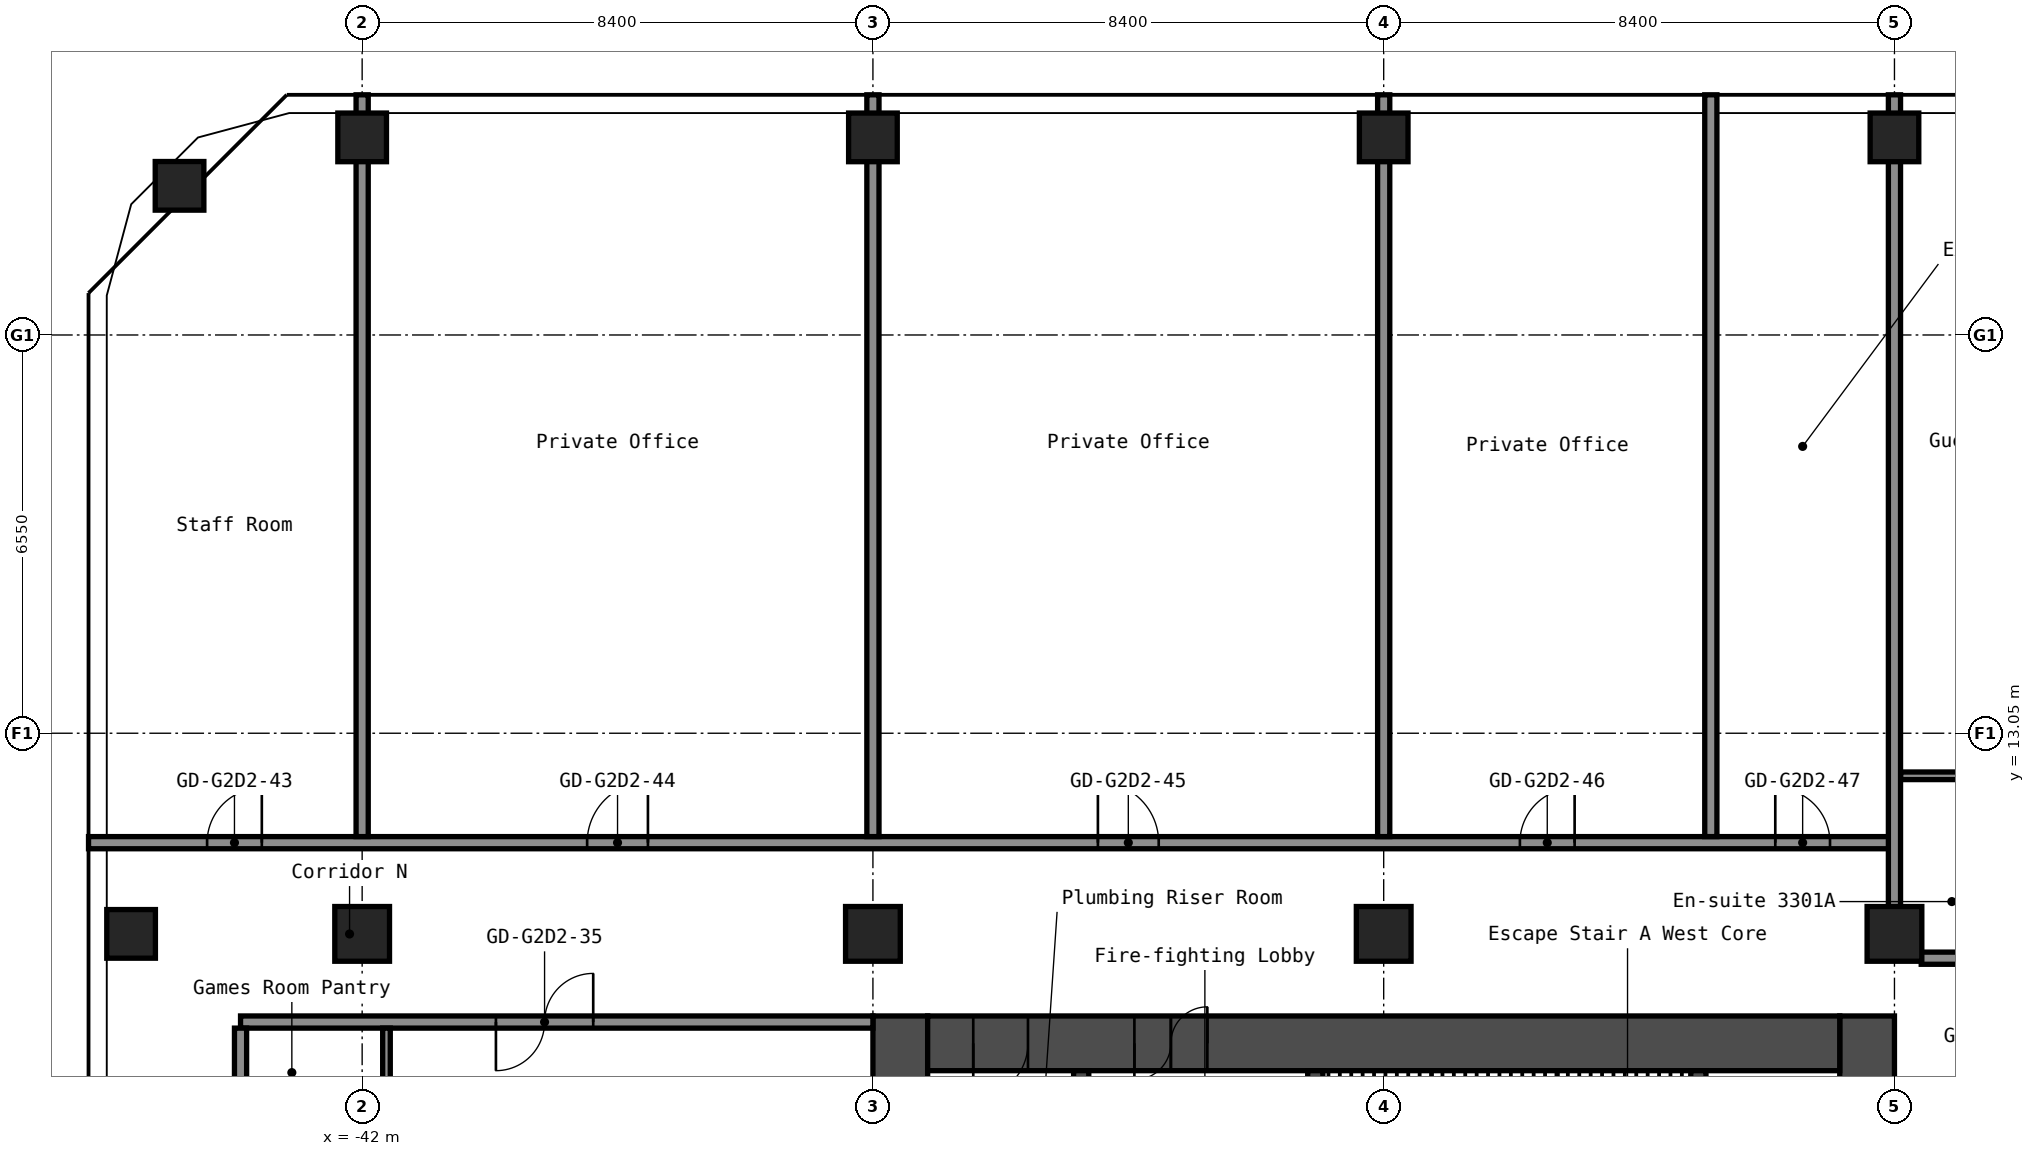
"""IFC4 building model, lengths in metres.
Left out: names, types, materials, properties, quantities, classifications, styles, units other than length and angle.
Written with IfcOpenShell. Run it as: python <this file> out.ifc"""

import sys

from ifc_helpers import new_model, si_unit, direction, frame, frame_2d, origin, origin_2d, place, context, subcontext, project, spatial, rectangle, hollow_rectangle, extrude, element, fill, save


model = new_model("IFC4")
c1 = context("Model", 3, precision=1e-05, world=origin(), true_north=direction((0.0, 1.0)))
c2 = subcontext(c1, "Body", "Model", "MODEL_VIEW")
j1 = project(units=[si_unit("LENGTHUNIT", "METRE"), si_unit("PLANEANGLEUNIT", "RADIAN")], contexts=[c1])
p1 = place(None, origin())
s1 = spatial("IfcSite", under=j1, at=p1, CompositionType="ELEMENT")
p2 = place(p1, origin())
s2 = spatial("IfcBuilding", under=s1, at=p2, CompositionType="ELEMENT")
p3 = place(p2, frame((0.0, 0.0, 117.0)))
s3 = spatial("IfcBuildingStorey", under=s2, at=p3, CompositionType="ELEMENT", Elevation=117.0)
for number, where, z_axis, x_axis in (
    (1, (-45.8, 9.75, 0.0), (0.0, 0.0, 1.0), (1.0, 0.0, 0.0)),
    (2, (-45.003, 22.053, 0.0), (0.0, 0.0, 1.0), (1.0, 0.0, 0.0)),
):
    element("IfcColumn", number, at=place(p3, frame(where, z_axis=z_axis, x_axis=x_axis)), inside=s3, PredefinedType="COLUMN", context=c2, shape_type="SweptSolid", body=[
        extrude(hollow_rectangle(XDim=0.8, YDim=0.8, WallThickness=0.032, at=origin_2d()), origin(), (0.0, 0.0, 1.0), 2.9),
    ])
p4 = place(p3, frame((-42.0, 9.75, 0.0), z_axis=(0.0, 0.0, 1.0), x_axis=(1.0, 0.0, 0.0)))
e3 = element("IfcColumn", 3, at=p4, inside=s3, PredefinedType="COLUMN", context=c2, shape_type="SweptSolid", body=[
    extrude(hollow_rectangle(XDim=0.9, YDim=0.9, WallThickness=0.036, at=origin_2d()), origin(), (0.0, 0.0, 1.0), 2.9),
])
p5 = place(p3, frame((-42.0, 22.85, 0.0), z_axis=(0.0, 0.0, 1.0), x_axis=(1.0, 0.0, 0.0)))
e4 = element("IfcColumn", 4, at=p5, inside=s3, PredefinedType="COLUMN", context=c2, shape_type="SweptSolid", body=[
    extrude(hollow_rectangle(XDim=0.8, YDim=0.8, WallThickness=0.032, at=origin_2d()), origin(), (0.0, 0.0, 1.0), 2.9),
])
p6 = place(p3, frame((-33.6, 9.75, 0.0), z_axis=(0.0, 0.0, 1.0), x_axis=(1.0, 0.0, 0.0)))
e5 = element("IfcColumn", 5, at=p6, inside=s3, PredefinedType="COLUMN", context=c2, shape_type="SweptSolid", body=[
    extrude(hollow_rectangle(XDim=0.9, YDim=0.9, WallThickness=0.036, at=origin_2d()), origin(), (0.0, 0.0, 1.0), 2.9),
])
p7 = place(p3, frame((-33.6, 22.85, 0.0), z_axis=(0.0, 0.0, 1.0), x_axis=(1.0, 0.0, 0.0)))
e6 = element("IfcColumn", 6, at=p7, inside=s3, PredefinedType="COLUMN", context=c2, shape_type="SweptSolid", body=[
    extrude(hollow_rectangle(XDim=0.8, YDim=0.8, WallThickness=0.032, at=origin_2d()), origin(), (0.0, 0.0, 1.0), 2.9),
])
p8 = place(p3, frame((-25.2, 9.75, 0.0), z_axis=(0.0, 0.0, 1.0), x_axis=(1.0, 0.0, 0.0)))
e7 = element("IfcColumn", 7, at=p8, inside=s3, PredefinedType="COLUMN", context=c2, shape_type="SweptSolid", body=[
    extrude(hollow_rectangle(XDim=0.9, YDim=0.9, WallThickness=0.036, at=origin_2d()), origin(), (0.0, 0.0, 1.0), 2.9),
])
p9 = place(p3, frame((-25.2, 22.85, 0.0), z_axis=(0.0, 0.0, 1.0), x_axis=(1.0, 0.0, 0.0)))
e8 = element("IfcColumn", 8, at=p9, inside=s3, PredefinedType="COLUMN", context=c2, shape_type="SweptSolid", body=[
    extrude(hollow_rectangle(XDim=0.8, YDim=0.8, WallThickness=0.032, at=origin_2d()), origin(), (0.0, 0.0, 1.0), 2.9),
])
p10 = place(p3, frame((-16.8, 9.75, 0.0), z_axis=(0.0, 0.0, 1.0), x_axis=(1.0, 0.0, 0.0)))
e9 = element("IfcColumn", 9, at=p10, inside=s3, PredefinedType="COLUMN", context=c2, shape_type="SweptSolid", body=[
    extrude(hollow_rectangle(XDim=0.9, YDim=0.9, WallThickness=0.036, at=origin_2d()), origin(), (0.0, 0.0, 1.0), 2.9),
])
p11 = place(p3, frame((-16.8, 22.85, 0.0), z_axis=(0.0, 0.0, 1.0), x_axis=(1.0, 0.0, 0.0)))
e10 = element("IfcColumn", 10, at=p11, inside=s3, PredefinedType="COLUMN", context=c2, shape_type="SweptSolid", body=[
    extrude(hollow_rectangle(XDim=0.8, YDim=0.8, WallThickness=0.032, at=origin_2d()), origin(), (0.0, 0.0, 1.0), 2.9),
])
p12 = place(p3, frame((-17.25, -8.4, 0.0), z_axis=(0.0, 0.0, 1.0), x_axis=(0.0, 1.0, 0.0)))
e11 = element("IfcWall", 11, at=p12, inside=s3, PredefinedType="SHEAR", context=c2, shape_type="SweptSolid", body=[
    extrude(rectangle(XDim=16.8, YDim=0.9, at=frame_2d((8.4, 0.0))), origin(), (0.0, 0.0, 1.0), 2.9),
])
p13 = place(p12, frame((7.6, 0.0, 0.0)))
e12 = element("IfcOpeningElement", 12, at=p13, cuts=e11, PredefinedType="OPENING", context=c2, shape_type="SweptSolid", body=[
    extrude(rectangle(XDim=1.2, YDim=2.1, at=frame_2d((0.6, 1.05))), frame((0.0, 0.46, 0.0), z_axis=(0.0, -1.0, 0.0), x_axis=(1.0, 0.0, 0.0)), (0.0, 0.0, 1.0), 0.92),
])
p14 = place(p3, frame((-33.15, -8.4, 0.0), z_axis=(0.0, 0.0, 1.0), x_axis=(0.0, 1.0, 0.0)))
e13 = element("IfcWall", 13, at=p14, inside=s3, PredefinedType="SHEAR", context=c2, shape_type="SweptSolid", body=[
    extrude(rectangle(XDim=16.8, YDim=0.9, at=frame_2d((8.4, 0.0))), origin(), (0.0, 0.0, 1.0), 2.9),
])
p15 = place(p3, frame((-32.7, 7.95, 0.0), z_axis=(0.0, 0.0, 1.0), x_axis=(1.0, 0.0, 0.0)))
e14 = element("IfcWall", 14, at=p15, inside=s3, PredefinedType="SHEAR", context=c2, shape_type="SweptSolid", body=[
    extrude(rectangle(XDim=15.0, YDim=0.9, at=frame_2d((7.5, 0.0))), origin(), (0.0, 0.0, 1.0), 2.9),
])
p16 = place(p15, frame((3.4, 0.0, 0.0)))
e15 = element("IfcOpeningElement", 15, at=p16, cuts=e14, PredefinedType="OPENING", context=c2, shape_type="SweptSolid", body=[
    extrude(rectangle(XDim=1.2, YDim=2.1, at=frame_2d((0.6, 1.05))), frame((0.0, 0.46, 0.0), z_axis=(0.0, -1.0, 0.0), x_axis=(1.0, 0.0, 0.0)), (0.0, 0.0, 1.0), 0.92),
])
p17 = place(p15, frame((0.75, 0.0, 0.0)))
e16 = element("IfcOpeningElement", 16, at=p17, cuts=e14, PredefinedType="OPENING", context=c2, shape_type="SweptSolid", body=[
    extrude(rectangle(XDim=0.9, YDim=2.1, at=frame_2d((0.45, 1.05))), frame((0.0, 0.46, 0.0), z_axis=(0.0, -1.0, 0.0), x_axis=(1.0, 0.0, 0.0)), (0.0, 0.0, 1.0), 0.92),
])
p18 = place(p3, frame((-20.025, 1.2, 0.0), z_axis=(0.0, 0.0, 1.0), x_axis=(0.0, 1.0, 0.0)))
e17 = element("IfcWall", 17, at=p18, inside=s3, PredefinedType="SHEAR", context=c2, shape_type="SweptSolid", body=[
    extrude(rectangle(XDim=6.3, YDim=0.25, at=frame_2d((3.15, 0.0))), origin(), (0.0, 0.0, 1.0), 2.9),
])
p19 = place(p3, frame((-26.325, 3.75, 0.0), z_axis=(0.0, 0.0, 1.0), x_axis=(0.0, 1.0, 0.0)))
e18 = element("IfcWall", 18, at=p19, inside=s3, PredefinedType="SHEAR", context=c2, shape_type="SweptSolid", body=[
    extrude(rectangle(XDim=3.75, YDim=0.25, at=frame_2d((1.875, 0.0))), origin(), (0.0, 0.0, 1.0), 2.9),
])
p20 = place(p19, frame((1.25, 0.0, 0.0)))
e19 = element("IfcOpeningElement", 19, at=p20, cuts=e18, PredefinedType="OPENING", context=c2, shape_type="SweptSolid", body=[
    extrude(rectangle(XDim=1.2, YDim=2.1, at=frame_2d((0.6, 1.05))), frame((0.0, 0.135, 0.0), z_axis=(0.0, -1.0, 0.0), x_axis=(1.0, 0.0, 0.0)), (0.0, 0.0, 1.0), 0.27),
])
p21 = place(p3, frame((-30.175, 1.45, 0.0), z_axis=(0.0, 0.0, 1.0), x_axis=(0.0, 1.0, 0.0)))
e20 = element("IfcWall", 20, at=p21, inside=s3, PredefinedType="SHEAR", context=c2, shape_type="SweptSolid", body=[
    extrude(rectangle(XDim=6.05, YDim=0.25, at=frame_2d((3.025, 0.0))), origin(), (0.0, 0.0, 1.0), 2.9),
])
p22 = place(p21, frame((2.625, 0.0, 0.0)))
e21 = element("IfcOpeningElement", 21, at=p22, cuts=e20, PredefinedType="OPENING", context=c2, shape_type="SweptSolid", body=[
    extrude(rectangle(XDim=1.1, YDim=2.1, at=frame_2d((0.55, 1.05))), frame((0.0, 0.135, 0.0), z_axis=(0.0, -1.0, 0.0), x_axis=(1.0, 0.0, 0.0)), (0.0, 0.0, 1.0), 0.27),
])
p23 = place(p3, frame((-44.0, 8.3, 0.0), z_axis=(0.0, 0.0, 1.0), x_axis=(1.0, 0.0, 0.0)))
e22 = element("IfcWall", 22, at=p23, inside=s3, PredefinedType="PARTITIONING", context=c2, shape_type="SweptSolid", body=[
    extrude(rectangle(XDim=10.4, YDim=0.2, at=frame_2d((5.2, 0.0))), origin(), (0.0, 0.0, 1.0), 2.9),
])
p24 = place(p23, frame((4.2, 0.0, 0.0)))
e23 = element("IfcOpeningElement", 23, at=p24, cuts=e22, PredefinedType="OPENING", context=c2, shape_type="SweptSolid", body=[
    extrude(rectangle(XDim=1.6, YDim=2.1, at=frame_2d((0.8, 1.05))), frame((0.0, 0.11, 0.0), z_axis=(0.0, -1.0, 0.0), x_axis=(1.0, 0.0, 0.0)), (0.0, 0.0, 1.0), 0.22),
])
p25 = place(p3, frame((-16.36, 9.35, 0.0), z_axis=(0.0, 0.0, 1.0), x_axis=(1.0, 0.0, 0.0)))
e24 = element("IfcWall", 24, at=p25, inside=s3, PredefinedType="PARTITIONING", context=c2, shape_type="SweptSolid", body=[
    extrude(rectangle(XDim=32.72, YDim=0.2, at=frame_2d((16.36, 0.0))), origin(), (0.0, 0.0, 1.0), 2.9),
])
p26 = place(p25, frame((2.41, 0.0, 0.0)))
e25 = element("IfcOpeningElement", 25, at=p26, cuts=e24, PredefinedType="OPENING", context=c2, shape_type="SweptSolid", body=[
    extrude(rectangle(XDim=1.0, YDim=2.1, at=frame_2d((0.5, 1.05))), frame((0.0, 0.11, 0.0), z_axis=(0.0, -1.0, 0.0), x_axis=(1.0, 0.0, 0.0)), (0.0, 0.0, 1.0), 0.22),
])
p27 = place(p25, frame((4.11, 0.0, 0.0)))
e26 = element("IfcOpeningElement", 26, at=p27, cuts=e24, PredefinedType="OPENING", context=c2, shape_type="SweptSolid", body=[
    extrude(rectangle(XDim=1.0, YDim=2.1, at=frame_2d((0.5, 1.05))), frame((0.0, 0.11, 0.0), z_axis=(0.0, -1.0, 0.0), x_axis=(1.0, 0.0, 0.0)), (0.0, 0.0, 1.0), 0.22),
])
p28 = place(p25, frame((9.96, 0.0, 0.0)))
e27 = element("IfcOpeningElement", 27, at=p28, cuts=e24, PredefinedType="OPENING", context=c2, shape_type="SweptSolid", body=[
    extrude(rectangle(XDim=1.0, YDim=2.1, at=frame_2d((0.5, 1.05))), frame((0.0, 0.11, 0.0), z_axis=(0.0, -1.0, 0.0), x_axis=(1.0, 0.0, 0.0)), (0.0, 0.0, 1.0), 0.22),
])
p29 = place(p25, frame((19.21, 0.0, 0.0)))
e28 = element("IfcOpeningElement", 28, at=p29, cuts=e24, PredefinedType="OPENING", context=c2, shape_type="SweptSolid", body=[
    extrude(rectangle(XDim=1.0, YDim=2.1, at=frame_2d((0.5, 1.05))), frame((0.0, 0.11, 0.0), z_axis=(0.0, -1.0, 0.0), x_axis=(1.0, 0.0, 0.0)), (0.0, 0.0, 1.0), 0.22),
])
p30 = place(p25, frame((20.91, 0.0, 0.0)))
e29 = element("IfcOpeningElement", 29, at=p30, cuts=e24, PredefinedType="OPENING", context=c2, shape_type="SweptSolid", body=[
    extrude(rectangle(XDim=1.0, YDim=2.1, at=frame_2d((0.5, 1.05))), frame((0.0, 0.11, 0.0), z_axis=(0.0, -1.0, 0.0), x_axis=(1.0, 0.0, 0.0)), (0.0, 0.0, 1.0), 0.22),
])
p31 = place(p25, frame((26.76, 0.0, 0.0)))
e30 = element("IfcOpeningElement", 30, at=p31, cuts=e24, PredefinedType="OPENING", context=c2, shape_type="SweptSolid", body=[
    extrude(rectangle(XDim=1.0, YDim=2.1, at=frame_2d((0.5, 1.05))), frame((0.0, 0.11, 0.0), z_axis=(0.0, -1.0, 0.0), x_axis=(1.0, 0.0, 0.0)), (0.0, 0.0, 1.0), 0.22),
])
p32 = place(p3, frame((-46.5, 11.25, 0.0), z_axis=(0.0, 0.0, 1.0), x_axis=(1.0, 0.0, 0.0)))
e31 = element("IfcWall", 31, at=p32, inside=s3, PredefinedType="PARTITIONING", context=c2, shape_type="SweptSolid", body=[
    extrude(rectangle(XDim=29.7, YDim=0.2, at=frame_2d((14.85, 0.0))), origin(), (0.0, 0.0, 1.0), 2.9),
])
p33 = place(p32, frame((1.95, 0.0, 0.0)))
e32 = element("IfcOpeningElement", 32, at=p33, cuts=e31, PredefinedType="OPENING", context=c2, shape_type="SweptSolid", body=[
    extrude(rectangle(XDim=0.9, YDim=2.1, at=frame_2d((0.45, 1.05))), frame((0.0, 0.11, 0.0), z_axis=(0.0, -1.0, 0.0), x_axis=(1.0, 0.0, 0.0)), (0.0, 0.0, 1.0), 0.22),
])
p34 = place(p32, frame((8.2, 0.0, 0.0)))
e33 = element("IfcOpeningElement", 33, at=p34, cuts=e31, PredefinedType="OPENING", context=c2, shape_type="SweptSolid", body=[
    extrude(rectangle(XDim=1.0, YDim=2.1, at=frame_2d((0.5, 1.05))), frame((0.0, 0.11, 0.0), z_axis=(0.0, -1.0, 0.0), x_axis=(1.0, 0.0, 0.0)), (0.0, 0.0, 1.0), 0.22),
])
p35 = place(p32, frame((16.6, 0.0, 0.0)))
e34 = element("IfcOpeningElement", 34, at=p35, cuts=e31, PredefinedType="OPENING", context=c2, shape_type="SweptSolid", body=[
    extrude(rectangle(XDim=1.0, YDim=2.1, at=frame_2d((0.5, 1.05))), frame((0.0, 0.11, 0.0), z_axis=(0.0, -1.0, 0.0), x_axis=(1.0, 0.0, 0.0)), (0.0, 0.0, 1.0), 0.22),
])
p36 = place(p32, frame((23.54, 0.0, 0.0)))
e35 = element("IfcOpeningElement", 35, at=p36, cuts=e31, PredefinedType="OPENING", context=c2, shape_type="SweptSolid", body=[
    extrude(rectangle(XDim=0.9, YDim=2.1, at=frame_2d((0.45, 1.05))), frame((0.0, 0.11, 0.0), z_axis=(0.0, -1.0, 0.0), x_axis=(1.0, 0.0, 0.0)), (0.0, 0.0, 1.0), 0.22),
])
p37 = place(p32, frame((27.74, 0.0, 0.0)))
e36 = element("IfcOpeningElement", 36, at=p37, cuts=e31, PredefinedType="OPENING", context=c2, shape_type="SweptSolid", body=[
    extrude(rectangle(XDim=0.9, YDim=2.1, at=frame_2d((0.45, 1.05))), frame((0.0, 0.11, 0.0), z_axis=(0.0, -1.0, 0.0), x_axis=(1.0, 0.0, 0.0)), (0.0, 0.0, 1.0), 0.22),
])
p38 = place(p3, frame((-16.7, 12.35, 0.0), z_axis=(0.0, 0.0, 1.0), x_axis=(1.0, 0.0, 0.0)))
e37 = element("IfcWall", 37, at=p38, inside=s3, PredefinedType="PARTITIONING", context=c2, shape_type="SweptSolid", body=[
    extrude(rectangle(XDim=2.337, YDim=0.125, at=frame_2d((1.169, 0.0))), origin(), (0.0, 0.0, 1.0), 2.9),
])
p39 = place(p3, frame((-44.0, -8.2, 0.0), z_axis=(0.0, 0.0, 1.0), x_axis=(0.0, 1.0, 0.0)))
e38 = element("IfcWall", 38, at=p39, inside=s3, PredefinedType="PARTITIONING", context=c2, shape_type="SweptSolid", body=[
    extrude(rectangle(XDim=16.4, YDim=0.2, at=frame_2d((8.2, 0.0))), origin(), (0.0, 0.0, 1.0), 2.9),
])
p40 = place(p3, frame((-42.0, 11.35, 0.0), z_axis=(0.0, 0.0, 1.0), x_axis=(0.0, 1.0, 0.0)))
e39 = element("IfcWall", 39, at=p40, inside=s3, PredefinedType="PARTITIONING", context=c2, shape_type="SweptSolid", body=[
    extrude(rectangle(XDim=12.2, YDim=0.2, at=frame_2d((6.1, 0.0))), origin(), (0.0, 0.0, 1.0), 2.9),
])
p41 = place(p3, frame((-41.6, 5.7, 0.0), z_axis=(0.0, 0.0, 1.0), x_axis=(0.0, 1.0, 0.0)))
e40 = element("IfcWall", 40, at=p41, inside=s3, PredefinedType="PARTITIONING", context=c2, shape_type="SweptSolid", body=[
    extrude(rectangle(XDim=2.5, YDim=0.125, at=frame_2d((1.25, 0.0))), origin(), (0.0, 0.0, 1.0), 2.9),
])
p42 = place(p41, frame((0.55, 0.0, 0.0)))
e41 = element("IfcOpeningElement", 41, at=p42, cuts=e40, PredefinedType="OPENING", context=c2, shape_type="SweptSolid", body=[
    extrude(rectangle(XDim=0.9, YDim=2.1, at=frame_2d((0.45, 1.05))), frame((0.0, 0.073, 0.0), z_axis=(0.0, -1.0, 0.0), x_axis=(1.0, 0.0, 0.0)), (0.0, 0.0, 1.0), 0.145),
])
for number, where, z_axis, x_axis in (
    (42, (-33.6, 11.35, 0.0), (0.0, 0.0, 1.0), (0.0, 1.0, 0.0)),
    (43, (-25.2, 11.35, 0.0), (0.0, 0.0, 1.0), (0.0, 1.0, 0.0)),
    (44, (-19.82, 11.35, 0.0), (0.0, 0.0, 1.0), (0.0, 1.0, 0.0)),
):
    element("IfcWall", number, at=place(p3, frame(where, z_axis=z_axis, x_axis=x_axis)), inside=s3, PredefinedType="PARTITIONING", context=c2, shape_type="SweptSolid", body=[
        extrude(rectangle(XDim=12.2, YDim=0.2, at=frame_2d((6.1, 0.0))), origin(), (0.0, 0.0, 1.0), 2.9),
    ])
p43 = place(p3, frame((-16.8, 10.19, 0.0), z_axis=(0.0, 0.0, 1.0), x_axis=(0.0, 1.0, 0.0)))
e45 = element("IfcWall", 45, at=p43, inside=s3, PredefinedType="PARTITIONING", context=c2, shape_type="SweptSolid", body=[
    extrude(rectangle(XDim=13.36, YDim=0.2, at=frame_2d((6.68, 0.0))), origin(), (0.0, 0.0, 1.0), 2.9),
])
p44 = place(p16, origin())
e46 = element("IfcDoor", 46, at=p44, inside=s3, OperationType="DOUBLE_DOOR_SINGLE_SWING", PredefinedType="DOOR", context=c2, shape_type="SweptSolid", body=[
    extrude(rectangle(XDim=1.2, YDim=2.1, at=frame_2d((0.6, 1.05))), frame((0.0, 0.025, 0.0), z_axis=(0.0, -1.0, 0.0), x_axis=(1.0, 0.0, 0.0)), (0.0, 0.0, 1.0), 0.05),
])
fill(e15, e46)
p45 = place(p17, origin())
e47 = element("IfcDoor", 47, at=p45, inside=s3, OperationType="SINGLE_SWING_LEFT", PredefinedType="DOOR", context=c2, shape_type="SweptSolid", body=[
    extrude(rectangle(XDim=0.9, YDim=2.1, at=frame_2d((0.45, 1.05))), frame((0.0, 0.025, 0.0), z_axis=(0.0, -1.0, 0.0), x_axis=(1.0, 0.0, 0.0)), (0.0, 0.0, 1.0), 0.05),
])
fill(e16, e47)
p46 = place(p24, origin())
e48 = element("IfcDoor", 48, at=p46, inside=s3, OperationType="DOUBLE_DOOR_SINGLE_SWING", PredefinedType="DOOR", context=c2, shape_type="SweptSolid", body=[
    extrude(rectangle(XDim=1.6, YDim=2.1, at=frame_2d((0.8, 1.05))), frame((0.0, 0.025, 0.0), z_axis=(0.0, -1.0, 0.0), x_axis=(1.0, 0.0, 0.0)), (0.0, 0.0, 1.0), 0.05),
])
fill(e23, e48)
p47 = place(p33, origin())
e49 = element("IfcDoor", 49, at=p47, inside=s3, OperationType="SINGLE_SWING_LEFT", PredefinedType="DOOR", context=c2, shape_type="SweptSolid", body=[
    extrude(rectangle(XDim=0.9, YDim=2.1, at=frame_2d((0.45, 1.05))), frame((0.0, 0.025, 0.0), z_axis=(0.0, -1.0, 0.0), x_axis=(1.0, 0.0, 0.0)), (0.0, 0.0, 1.0), 0.05),
])
fill(e32, e49)
p48 = place(p34, origin())
e50 = element("IfcDoor", 50, at=p48, inside=s3, OperationType="SINGLE_SWING_LEFT", PredefinedType="DOOR", context=c2, shape_type="SweptSolid", body=[
    extrude(rectangle(XDim=1.0, YDim=2.1, at=frame_2d((0.5, 1.05))), frame((0.0, 0.025, 0.0), z_axis=(0.0, -1.0, 0.0), x_axis=(1.0, 0.0, 0.0)), (0.0, 0.0, 1.0), 0.05),
])
fill(e33, e50)
p49 = place(p35, origin())
e51 = element("IfcDoor", 51, at=p49, inside=s3, OperationType="SINGLE_SWING_RIGHT", PredefinedType="DOOR", context=c2, shape_type="SweptSolid", body=[
    extrude(rectangle(XDim=1.0, YDim=2.1, at=frame_2d((0.5, 1.05))), frame((0.0, 0.025, 0.0), z_axis=(0.0, -1.0, 0.0), x_axis=(1.0, 0.0, 0.0)), (0.0, 0.0, 1.0), 0.05),
])
fill(e34, e51)
p50 = place(p36, origin())
e52 = element("IfcDoor", 52, at=p50, inside=s3, OperationType="SINGLE_SWING_LEFT", PredefinedType="DOOR", context=c2, shape_type="SweptSolid", body=[
    extrude(rectangle(XDim=0.9, YDim=2.1, at=frame_2d((0.45, 1.05))), frame((0.0, 0.025, 0.0), z_axis=(0.0, -1.0, 0.0), x_axis=(1.0, 0.0, 0.0)), (0.0, 0.0, 1.0), 0.05),
])
fill(e35, e52)
p51 = place(p37, origin())
e53 = element("IfcDoor", 53, at=p51, inside=s3, OperationType="SINGLE_SWING_RIGHT", PredefinedType="DOOR", context=c2, shape_type="SweptSolid", body=[
    extrude(rectangle(XDim=0.9, YDim=2.1, at=frame_2d((0.45, 1.05))), frame((0.0, 0.025, 0.0), z_axis=(0.0, -1.0, 0.0), x_axis=(1.0, 0.0, 0.0)), (0.0, 0.0, 1.0), 0.05),
])
fill(e36, e53)
save(model, sys.argv[1])
